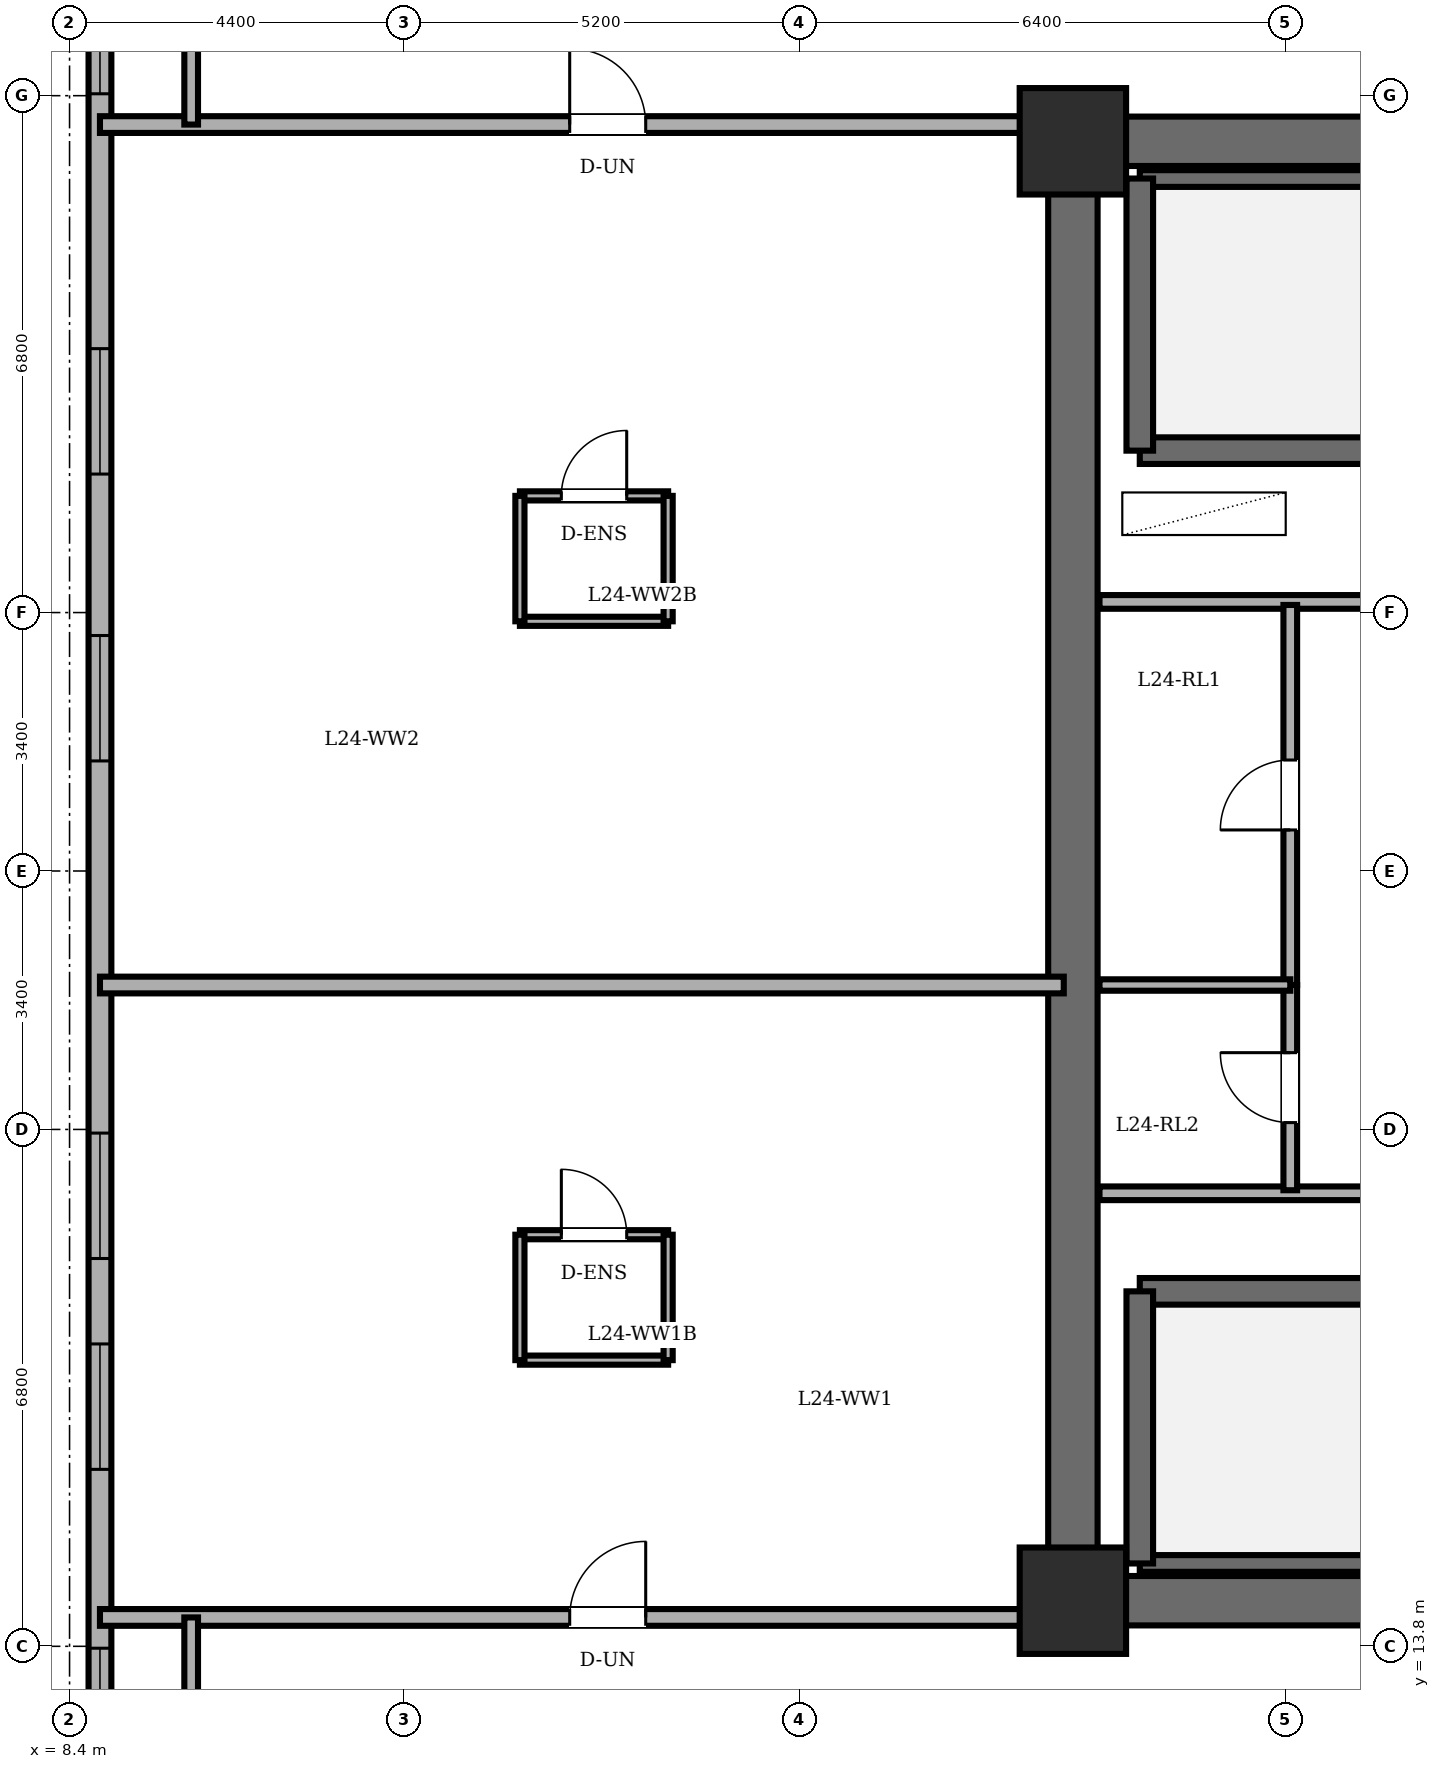
"""IFC4 building model, lengths in metres.
Left out: names, types, materials, properties, quantities, classifications, styles, units other than length and angle.
Written with IfcOpenShell. Run it as: python <this file> out.ifc"""

import sys

from ifc_helpers import new_model, si_unit, direction, frame, frame_2d, origin, origin_2d, place, context, subcontext, project, spatial, rectangle, extrude, element, fill, save


model = new_model("IFC4")
c1 = context("Model", 3, precision=1e-05, world=origin(), true_north=direction((0.0, 1.0)))
c2 = subcontext(c1, "Body", "Model", "MODEL_VIEW")
j1 = project(units=[si_unit("LENGTHUNIT", "METRE"), si_unit("PLANEANGLEUNIT", "RADIAN")], contexts=[c1])
p1 = place(None, origin())
s1 = spatial("IfcSite", under=j1, at=p1, CompositionType="ELEMENT")
p2 = place(p1, origin())
s2 = spatial("IfcBuilding", under=s1, at=p2, CompositionType="ELEMENT")
p3 = place(p2, frame((0.0, 0.0, 93.5)))
s3 = spatial("IfcBuildingStorey", under=s2, at=p3, CompositionType="ELEMENT", Elevation=93.5)
for number, where, z_axis, x_axis in (
    (1, (21.6, 14.4, 0.0), (0.0, 0.0, 1.0), (1.0, 0.0, 0.0)),
    (2, (21.6, 33.6, 0.0), (0.0, 0.0, 1.0), (1.0, 0.0, 0.0)),
):
    element("IfcColumn", number, at=place(p3, frame(where, z_axis=z_axis, x_axis=x_axis)), inside=s3, PredefinedType="COLUMN", context=c2, shape_type="SweptSolid", body=[
        extrude(rectangle(XDim=1.4, YDim=1.4, at=origin_2d()), origin(), (0.0, 0.0, 1.0), 3.6),
    ])
p4 = place(p3, frame((8.8, 38.2, 0.0), z_axis=(0.0, 0.0, 1.0), x_axis=(0.0, -1.0, 0.0)))
e3 = element("IfcWall", 3, at=p4, inside=s3, PredefinedType="SOLIDWALL", context=c2, shape_type="SweptSolid", body=[
    extrude(rectangle(XDim=28.4, YDim=0.3, at=frame_2d((14.2, 0.0))), origin(), (0.0, 0.0, 1.0), 3.4),
])
p5 = place(p4, frame((2.325, 0.0, 0.85)))
e4 = element("IfcOpeningElement", 4, at=p5, cuts=e3, PredefinedType="OPENING", context=c2, shape_type="SweptSolid", body=[
    extrude(rectangle(XDim=1.65, YDim=1.55, at=frame_2d((0.825, 0.775))), frame((0.0, 0.16, 0.0), z_axis=(0.0, -1.0, 0.0), x_axis=(1.0, 0.0, 0.0)), (0.0, 0.0, 1.0), 0.32),
])
p6 = place(p4, frame((7.328, 0.0, 0.85)))
e5 = element("IfcOpeningElement", 5, at=p6, cuts=e3, PredefinedType="OPENING", context=c2, shape_type="SweptSolid", body=[
    extrude(rectangle(XDim=1.65, YDim=1.55, at=frame_2d((0.825, 0.775))), frame((0.0, 0.16, 0.0), z_axis=(0.0, -1.0, 0.0), x_axis=(1.0, 0.0, 0.0)), (0.0, 0.0, 1.0), 0.32),
])
p7 = place(p4, frame((11.102, 0.0, 0.85)))
e6 = element("IfcOpeningElement", 6, at=p7, cuts=e3, PredefinedType="OPENING", context=c2, shape_type="SweptSolid", body=[
    extrude(rectangle(XDim=1.65, YDim=1.55, at=frame_2d((0.825, 0.775))), frame((0.0, 0.16, 0.0), z_axis=(0.0, -1.0, 0.0), x_axis=(1.0, 0.0, 0.0)), (0.0, 0.0, 1.0), 0.32),
])
p8 = place(p4, frame((17.648, 0.0, 0.85)))
e7 = element("IfcOpeningElement", 7, at=p8, cuts=e3, PredefinedType="OPENING", context=c2, shape_type="SweptSolid", body=[
    extrude(rectangle(XDim=1.65, YDim=1.55, at=frame_2d((0.825, 0.775))), frame((0.0, 0.16, 0.0), z_axis=(0.0, -1.0, 0.0), x_axis=(1.0, 0.0, 0.0)), (0.0, 0.0, 1.0), 0.32),
])
p9 = place(p4, frame((20.422, 0.0, 0.85)))
e8 = element("IfcOpeningElement", 8, at=p9, cuts=e3, PredefinedType="OPENING", context=c2, shape_type="SweptSolid", body=[
    extrude(rectangle(XDim=1.65, YDim=1.55, at=frame_2d((0.825, 0.775))), frame((0.0, 0.16, 0.0), z_axis=(0.0, -1.0, 0.0), x_axis=(1.0, 0.0, 0.0)), (0.0, 0.0, 1.0), 0.32),
])
p10 = place(p4, frame((24.425, 0.0, 0.85)))
e9 = element("IfcOpeningElement", 9, at=p10, cuts=e3, PredefinedType="OPENING", context=c2, shape_type="SweptSolid", body=[
    extrude(rectangle(XDim=1.65, YDim=1.55, at=frame_2d((0.825, 0.775))), frame((0.0, 0.16, 0.0), z_axis=(0.0, -1.0, 0.0), x_axis=(1.0, 0.0, 0.0)), (0.0, 0.0, 1.0), 0.32),
])
p11 = place(p3, frame((21.6, 14.4, 0.0), z_axis=(0.0, 0.0, 1.0), x_axis=(0.0, 1.0, 0.0)))
e10 = element("IfcWall", 10, at=p11, inside=s3, PredefinedType="SHEAR", context=c2, shape_type="SweptSolid", body=[
    extrude(rectangle(XDim=19.2, YDim=0.65, at=frame_2d((9.6, 0.0))), origin(), (0.0, 0.0, 1.0), 3.4),
])
for number, where, z_axis, x_axis in (
    (11, (21.6, 33.6, 0.0), (0.0, 0.0, 1.0), (1.0, 0.0, 0.0)),
    (12, (37.2, 14.4, 0.0), (0.0, 0.0, 1.0), (-1.0, 0.0, 0.0)),
):
    element("IfcWall", number, at=place(p3, frame(where, z_axis=z_axis, x_axis=x_axis)), inside=s3, PredefinedType="SHEAR", context=c2, shape_type="SweptSolid", body=[
        extrude(rectangle(XDim=15.6, YDim=0.65, at=frame_2d((7.8, 0.0))), origin(), (0.0, 0.0, 1.0), 3.4),
    ])
p12 = place(p3, frame((22.48, 29.53, 0.0), z_axis=(0.0, 0.0, 1.0), x_axis=(1.0, 0.0, 0.0)))
e13 = element("IfcWall", 13, at=p12, inside=s3, PredefinedType="SOLIDWALL", context=c2, shape_type="SweptSolid", body=[
    extrude(rectangle(XDim=7.79, YDim=0.35, at=frame_2d((3.895, 0.0))), origin(), (0.0, 0.0, 1.0), 3.4),
])
p13 = place(p3, frame((22.48, 33.11, 0.0), z_axis=(0.0, 0.0, 1.0), x_axis=(1.0, 0.0, 0.0)))
e14 = element("IfcWall", 14, at=p13, inside=s3, PredefinedType="PARTITIONING", context=c2, shape_type="SweptSolid", body=[
    extrude(rectangle(XDim=7.79, YDim=0.22, at=frame_2d((3.895, 0.0))), origin(), (0.0, 0.0, 1.0), 3.4),
])
p14 = place(p3, frame((22.48, 29.53, 0.0), z_axis=(0.0, 0.0, 1.0), x_axis=(0.0, 1.0, 0.0)))
e15 = element("IfcWall", 15, at=p14, inside=s3, PredefinedType="SOLIDWALL", context=c2, shape_type="SweptSolid", body=[
    extrude(rectangle(XDim=3.58, YDim=0.35, at=frame_2d((1.79, 0.0))), origin(), (0.0, 0.0, 1.0), 3.4),
])
p15 = place(p3, frame((22.48, 18.47, 0.0), z_axis=(0.0, 0.0, 1.0), x_axis=(1.0, 0.0, 0.0)))
e16 = element("IfcWall", 16, at=p15, inside=s3, PredefinedType="SOLIDWALL", context=c2, shape_type="SweptSolid", body=[
    extrude(rectangle(XDim=7.79, YDim=0.35, at=frame_2d((3.895, 0.0))), origin(), (0.0, 0.0, 1.0), 3.4),
])
p16 = place(p3, frame((22.48, 14.89, 0.0), z_axis=(0.0, 0.0, 1.0), x_axis=(1.0, 0.0, 0.0)))
e17 = element("IfcWall", 17, at=p16, inside=s3, PredefinedType="PARTITIONING", context=c2, shape_type="SweptSolid", body=[
    extrude(rectangle(XDim=7.79, YDim=0.22, at=frame_2d((3.895, 0.0))), origin(), (0.0, 0.0, 1.0), 3.4),
])
p17 = place(p3, frame((22.48, 14.89, 0.0), z_axis=(0.0, 0.0, 1.0), x_axis=(0.0, 1.0, 0.0)))
e18 = element("IfcWall", 18, at=p17, inside=s3, PredefinedType="SOLIDWALL", context=c2, shape_type="SweptSolid", body=[
    extrude(rectangle(XDim=3.58, YDim=0.35, at=frame_2d((1.79, 0.0))), origin(), (0.0, 0.0, 1.0), 3.4),
])
p18 = place(p3, frame((21.95, 27.54, 0.0), z_axis=(0.0, 0.0, 1.0), x_axis=(1.0, 0.0, 0.0)))
e19 = element("IfcWall", 19, at=p18, inside=s3, PredefinedType="PARTITIONING", context=c2, shape_type="SweptSolid", body=[
    extrude(rectangle(XDim=10.56, YDim=0.18, at=frame_2d((5.28, 0.0))), origin(), (0.0, 0.0, 1.0), 3.4),
])
p19 = place(p3, frame((21.95, 19.76, 0.0), z_axis=(0.0, 0.0, 1.0), x_axis=(1.0, 0.0, 0.0)))
e20 = element("IfcWall", 20, at=p19, inside=s3, PredefinedType="PARTITIONING", context=c2, shape_type="SweptSolid", body=[
    extrude(rectangle(XDim=14.87, YDim=0.18, at=frame_2d((7.435, 0.0))), origin(), (0.0, 0.0, 1.0), 3.4),
])
p20 = place(p3, frame((24.46, 22.5, 0.0), z_axis=(0.0, 0.0, 1.0), x_axis=(0.0, 1.0, 0.0)))
e21 = element("IfcWall", 21, at=p20, inside=s3, PredefinedType="PARTITIONING", context=c2, shape_type="SweptSolid", body=[
    extrude(rectangle(XDim=5.0, YDim=0.18, at=frame_2d((2.5, 0.0))), origin(), (0.0, 0.0, 1.0), 3.4),
])
p21 = place(p20, frame((2.04, 0.0, 0.0)))
e22 = element("IfcOpeningElement", 22, at=p21, cuts=e21, PredefinedType="OPENING", context=c2, shape_type="SweptSolid", body=[
    extrude(rectangle(XDim=0.92, YDim=2.1, at=frame_2d((0.46, 1.05))), frame((0.0, 0.1, 0.0), z_axis=(0.0, -1.0, 0.0), x_axis=(1.0, 0.0, 0.0)), (0.0, 0.0, 1.0), 0.2),
])
p22 = place(p3, frame((24.46, 19.8, 0.0), z_axis=(0.0, 0.0, 1.0), x_axis=(0.0, 1.0, 0.0)))
e23 = element("IfcWall", 23, at=p22, inside=s3, PredefinedType="PARTITIONING", context=c2, shape_type="SweptSolid", body=[
    extrude(rectangle(XDim=2.7, YDim=0.18, at=frame_2d((1.35, 0.0))), origin(), (0.0, 0.0, 1.0), 3.4),
])
p23 = place(p22, frame((0.89, 0.0, 0.0)))
e24 = element("IfcOpeningElement", 24, at=p23, cuts=e23, PredefinedType="OPENING", context=c2, shape_type="SweptSolid", body=[
    extrude(rectangle(XDim=0.92, YDim=2.1, at=frame_2d((0.46, 1.05))), frame((0.0, 0.1, 0.0), z_axis=(0.0, -1.0, 0.0), x_axis=(1.0, 0.0, 0.0)), (0.0, 0.0, 1.0), 0.2),
])
p24 = place(p3, frame((21.95, 22.5, 0.0), z_axis=(0.0, 0.0, 1.0), x_axis=(1.0, 0.0, 0.0)))
e25 = element("IfcWall", 25, at=p24, inside=s3, PredefinedType="PARTITIONING", context=c2, shape_type="SweptSolid", body=[
    extrude(rectangle(XDim=2.51, YDim=0.15, at=frame_2d((1.255, 0.0))), origin(), (0.0, 0.0, 1.0), 3.4),
])
p25 = place(p3, frame((14.325, 19.215, 0.0), z_axis=(0.0, 0.0, 1.0), x_axis=(1.0, 0.0, 0.0)))
e26 = element("IfcWall", 26, at=p25, inside=s3, PredefinedType="PARTITIONING", context=c2, shape_type="SweptSolid", body=[
    extrude(rectangle(XDim=1.95, YDim=0.12, at=frame_2d((0.975, 0.0))), origin(), (0.0, 0.0, 1.0), 3.4),
])
p26 = place(p25, frame((0.545, 0.0, 0.0)))
e27 = element("IfcOpeningElement", 27, at=p26, cuts=e26, PredefinedType="OPENING", context=c2, shape_type="SweptSolid", body=[
    extrude(rectangle(XDim=0.86, YDim=2.1, at=frame_2d((0.43, 1.05))), frame((0.0, 0.07, 0.0), z_axis=(0.0, -1.0, 0.0), x_axis=(1.0, 0.0, 0.0)), (0.0, 0.0, 1.0), 0.14),
])
p27 = place(p3, frame((16.275, 17.565, 0.0), z_axis=(0.0, 0.0, 1.0), x_axis=(-1.0, 0.0, 0.0)))
e28 = element("IfcWall", 28, at=p27, inside=s3, PredefinedType="PARTITIONING", context=c2, shape_type="SweptSolid", body=[
    extrude(rectangle(XDim=1.95, YDim=0.12, at=frame_2d((0.975, 0.0))), origin(), (0.0, 0.0, 1.0), 3.4),
])
for number, where, z_axis, x_axis in (
    (29, (14.325, 19.215, 0.0), (0.0, 0.0, 1.0), (0.0, -1.0, 0.0)),
    (30, (16.275, 17.565, 0.0), (0.0, 0.0, 1.0), (0.0, 1.0, 0.0)),
):
    element("IfcWall", number, at=place(p3, frame(where, z_axis=z_axis, x_axis=x_axis)), inside=s3, PredefinedType="PARTITIONING", context=c2, shape_type="SweptSolid", body=[
        extrude(rectangle(XDim=1.65, YDim=0.12, at=frame_2d((0.825, 0.0))), origin(), (0.0, 0.0, 1.0), 3.4),
    ])
p28 = place(p3, frame((14.325, 28.935, 0.0), z_axis=(0.0, 0.0, 1.0), x_axis=(1.0, 0.0, 0.0)))
e31 = element("IfcWall", 31, at=p28, inside=s3, PredefinedType="PARTITIONING", context=c2, shape_type="SweptSolid", body=[
    extrude(rectangle(XDim=1.95, YDim=0.12, at=frame_2d((0.975, 0.0))), origin(), (0.0, 0.0, 1.0), 3.4),
])
p29 = place(p28, frame((0.545, 0.0, 0.0)))
e32 = element("IfcOpeningElement", 32, at=p29, cuts=e31, PredefinedType="OPENING", context=c2, shape_type="SweptSolid", body=[
    extrude(rectangle(XDim=0.86, YDim=2.1, at=frame_2d((0.43, 1.05))), frame((0.0, 0.07, 0.0), z_axis=(0.0, -1.0, 0.0), x_axis=(1.0, 0.0, 0.0)), (0.0, 0.0, 1.0), 0.14),
])
p30 = place(p3, frame((16.275, 27.285, 0.0), z_axis=(0.0, 0.0, 1.0), x_axis=(-1.0, 0.0, 0.0)))
e33 = element("IfcWall", 33, at=p30, inside=s3, PredefinedType="PARTITIONING", context=c2, shape_type="SweptSolid", body=[
    extrude(rectangle(XDim=1.95, YDim=0.12, at=frame_2d((0.975, 0.0))), origin(), (0.0, 0.0, 1.0), 3.4),
])
for number, where, z_axis, x_axis in (
    (34, (14.325, 28.935, 0.0), (0.0, 0.0, 1.0), (0.0, -1.0, 0.0)),
    (35, (16.275, 27.285, 0.0), (0.0, 0.0, 1.0), (0.0, 1.0, 0.0)),
):
    element("IfcWall", number, at=place(p3, frame(where, z_axis=z_axis, x_axis=x_axis)), inside=s3, PredefinedType="PARTITIONING", context=c2, shape_type="SweptSolid", body=[
        extrude(rectangle(XDim=1.65, YDim=0.12, at=frame_2d((0.825, 0.0))), origin(), (0.0, 0.0, 1.0), 3.4),
    ])
p31 = place(p3, frame((8.8, 14.18, 0.0), z_axis=(0.0, 0.0, 1.0), x_axis=(1.0, 0.0, 0.0)))
e36 = element("IfcWall", 36, at=p31, inside=s3, PredefinedType="PARTITIONING", context=c2, shape_type="SweptSolid", body=[
    extrude(rectangle(XDim=12.68, YDim=0.22, at=frame_2d((6.34, 0.0))), origin(), (0.0, 0.0, 1.0), 3.4),
])
p32 = place(p31, frame((6.18, 0.0, 0.0)))
e37 = element("IfcOpeningElement", 37, at=p32, cuts=e36, PredefinedType="OPENING", context=c2, shape_type="SweptSolid", body=[
    extrude(rectangle(XDim=1.0, YDim=2.15, at=frame_2d((0.5, 1.075))), frame((0.0, 0.12, 0.0), z_axis=(0.0, -1.0, 0.0), x_axis=(1.0, 0.0, 0.0)), (0.0, 0.0, 1.0), 0.24),
])
p33 = place(p3, frame((8.8, 22.5, 0.0), z_axis=(0.0, 0.0, 1.0), x_axis=(1.0, 0.0, 0.0)))
e38 = element("IfcWall", 38, at=p33, inside=s3, PredefinedType="PARTITIONING", context=c2, shape_type="SweptSolid", body=[
    extrude(rectangle(XDim=12.68, YDim=0.22, at=frame_2d((6.34, 0.0))), origin(), (0.0, 0.0, 1.0), 3.4),
])
p34 = place(p3, frame((8.8, 33.82, 0.0), z_axis=(0.0, 0.0, 1.0), x_axis=(1.0, 0.0, 0.0)))
e39 = element("IfcWall", 39, at=p34, inside=s3, PredefinedType="PARTITIONING", context=c2, shape_type="SweptSolid", body=[
    extrude(rectangle(XDim=12.68, YDim=0.22, at=frame_2d((6.34, 0.0))), origin(), (0.0, 0.0, 1.0), 3.4),
])
p35 = place(p34, frame((6.18, 0.0, 0.0)))
e40 = element("IfcOpeningElement", 40, at=p35, cuts=e39, PredefinedType="OPENING", context=c2, shape_type="SweptSolid", body=[
    extrude(rectangle(XDim=1.0, YDim=2.15, at=frame_2d((0.5, 1.075))), frame((0.0, 0.12, 0.0), z_axis=(0.0, -1.0, 0.0), x_axis=(1.0, 0.0, 0.0)), (0.0, 0.0, 1.0), 0.24),
])
for number, where, z_axis, x_axis in (
    (41, (10.0, 11.72, 0.0), (0.0, 0.0, 1.0), (0.0, 1.0, 0.0)),
    (42, (10.0, 33.82, 0.0), (0.0, 0.0, 1.0), (0.0, 1.0, 0.0)),
):
    element("IfcWall", number, at=place(p3, frame(where, z_axis=z_axis, x_axis=x_axis)), inside=s3, PredefinedType="PARTITIONING", context=c2, shape_type="SweptSolid", body=[
        extrude(rectangle(XDim=2.46, YDim=0.18, at=frame_2d((1.23, 0.0))), origin(), (0.0, 0.0, 1.0), 3.4),
    ])
p36 = place(p5, origin())
e43 = element("IfcWindow", 43, at=p36, inside=s3, PartitioningType="DOUBLE_PANEL_VERTICAL", PredefinedType="WINDOW", context=c2, shape_type="SweptSolid", body=[
    extrude(rectangle(XDim=1.65, YDim=1.55, at=frame_2d((0.825, 0.775))), frame((0.0, 0.03, 0.0), z_axis=(0.0, -1.0, 0.0), x_axis=(1.0, 0.0, 0.0)), (0.0, 0.0, 1.0), 0.06),
])
fill(e4, e43)
p37 = place(p6, origin())
e44 = element("IfcWindow", 44, at=p37, inside=s3, PartitioningType="DOUBLE_PANEL_VERTICAL", PredefinedType="WINDOW", context=c2, shape_type="SweptSolid", body=[
    extrude(rectangle(XDim=1.65, YDim=1.55, at=frame_2d((0.825, 0.775))), frame((0.0, 0.03, 0.0), z_axis=(0.0, -1.0, 0.0), x_axis=(1.0, 0.0, 0.0)), (0.0, 0.0, 1.0), 0.06),
])
fill(e5, e44)
p38 = place(p7, origin())
e45 = element("IfcWindow", 45, at=p38, inside=s3, PartitioningType="DOUBLE_PANEL_VERTICAL", PredefinedType="WINDOW", context=c2, shape_type="SweptSolid", body=[
    extrude(rectangle(XDim=1.65, YDim=1.55, at=frame_2d((0.825, 0.775))), frame((0.0, 0.03, 0.0), z_axis=(0.0, -1.0, 0.0), x_axis=(1.0, 0.0, 0.0)), (0.0, 0.0, 1.0), 0.06),
])
fill(e6, e45)
p39 = place(p8, origin())
e46 = element("IfcWindow", 46, at=p39, inside=s3, PartitioningType="DOUBLE_PANEL_VERTICAL", PredefinedType="WINDOW", context=c2, shape_type="SweptSolid", body=[
    extrude(rectangle(XDim=1.65, YDim=1.55, at=frame_2d((0.825, 0.775))), frame((0.0, 0.03, 0.0), z_axis=(0.0, -1.0, 0.0), x_axis=(1.0, 0.0, 0.0)), (0.0, 0.0, 1.0), 0.06),
])
fill(e7, e46)
p40 = place(p9, origin())
e47 = element("IfcWindow", 47, at=p40, inside=s3, PartitioningType="DOUBLE_PANEL_VERTICAL", PredefinedType="WINDOW", context=c2, shape_type="SweptSolid", body=[
    extrude(rectangle(XDim=1.65, YDim=1.55, at=frame_2d((0.825, 0.775))), frame((0.0, 0.03, 0.0), z_axis=(0.0, -1.0, 0.0), x_axis=(1.0, 0.0, 0.0)), (0.0, 0.0, 1.0), 0.06),
])
fill(e8, e47)
p41 = place(p10, origin())
e48 = element("IfcWindow", 48, at=p41, inside=s3, PartitioningType="DOUBLE_PANEL_VERTICAL", PredefinedType="WINDOW", context=c2, shape_type="SweptSolid", body=[
    extrude(rectangle(XDim=1.65, YDim=1.55, at=frame_2d((0.825, 0.775))), frame((0.0, 0.03, 0.0), z_axis=(0.0, -1.0, 0.0), x_axis=(1.0, 0.0, 0.0)), (0.0, 0.0, 1.0), 0.06),
])
fill(e9, e48)
p42 = place(p21, origin())
e49 = element("IfcDoor", 49, at=p42, inside=s3, OperationType="SINGLE_SWING_LEFT", PredefinedType="DOOR", context=c2, shape_type="SweptSolid", body=[
    extrude(rectangle(XDim=0.92, YDim=2.1, at=frame_2d((0.46, 1.05))), frame((0.0, 0.025, 0.0), z_axis=(0.0, -1.0, 0.0), x_axis=(1.0, 0.0, 0.0)), (0.0, 0.0, 1.0), 0.05),
])
fill(e22, e49)
p43 = place(p23, origin())
e50 = element("IfcDoor", 50, at=p43, inside=s3, OperationType="SINGLE_SWING_RIGHT", PredefinedType="DOOR", context=c2, shape_type="SweptSolid", body=[
    extrude(rectangle(XDim=0.92, YDim=2.1, at=frame_2d((0.46, 1.05))), frame((0.0, 0.025, 0.0), z_axis=(0.0, -1.0, 0.0), x_axis=(1.0, 0.0, 0.0)), (0.0, 0.0, 1.0), 0.05),
])
fill(e24, e50)
p44 = place(p26, origin())
e51 = element("IfcDoor", 51, at=p44, inside=s3, OperationType="SINGLE_SWING_LEFT", PredefinedType="DOOR", context=c2, shape_type="SweptSolid", body=[
    extrude(rectangle(XDim=0.86, YDim=2.1, at=frame_2d((0.43, 1.05))), frame((0.0, 0.025, 0.0), z_axis=(0.0, -1.0, 0.0), x_axis=(1.0, 0.0, 0.0)), (0.0, 0.0, 1.0), 0.05),
])
fill(e27, e51)
p45 = place(p29, origin())
e52 = element("IfcDoor", 52, at=p45, inside=s3, OperationType="SINGLE_SWING_RIGHT", PredefinedType="DOOR", context=c2, shape_type="SweptSolid", body=[
    extrude(rectangle(XDim=0.86, YDim=2.1, at=frame_2d((0.43, 1.05))), frame((0.0, 0.025, 0.0), z_axis=(0.0, -1.0, 0.0), x_axis=(1.0, 0.0, 0.0)), (0.0, 0.0, 1.0), 0.05),
])
fill(e32, e52)
p46 = place(p32, origin())
e53 = element("IfcDoor", 53, at=p46, inside=s3, OperationType="SINGLE_SWING_RIGHT", PredefinedType="DOOR", context=c2, shape_type="SweptSolid", body=[
    extrude(rectangle(XDim=1.0, YDim=2.15, at=frame_2d((0.5, 1.075))), frame((0.0, 0.025, 0.0), z_axis=(0.0, -1.0, 0.0), x_axis=(1.0, 0.0, 0.0)), (0.0, 0.0, 1.0), 0.05),
])
fill(e37, e53)
p47 = place(p35, origin())
e54 = element("IfcDoor", 54, at=p47, inside=s3, OperationType="SINGLE_SWING_LEFT", PredefinedType="DOOR", context=c2, shape_type="SweptSolid", body=[
    extrude(rectangle(XDim=1.0, YDim=2.15, at=frame_2d((0.5, 1.075))), frame((0.0, 0.025, 0.0), z_axis=(0.0, -1.0, 0.0), x_axis=(1.0, 0.0, 0.0)), (0.0, 0.0, 1.0), 0.05),
])
fill(e40, e54)
save(model, sys.argv[1])
